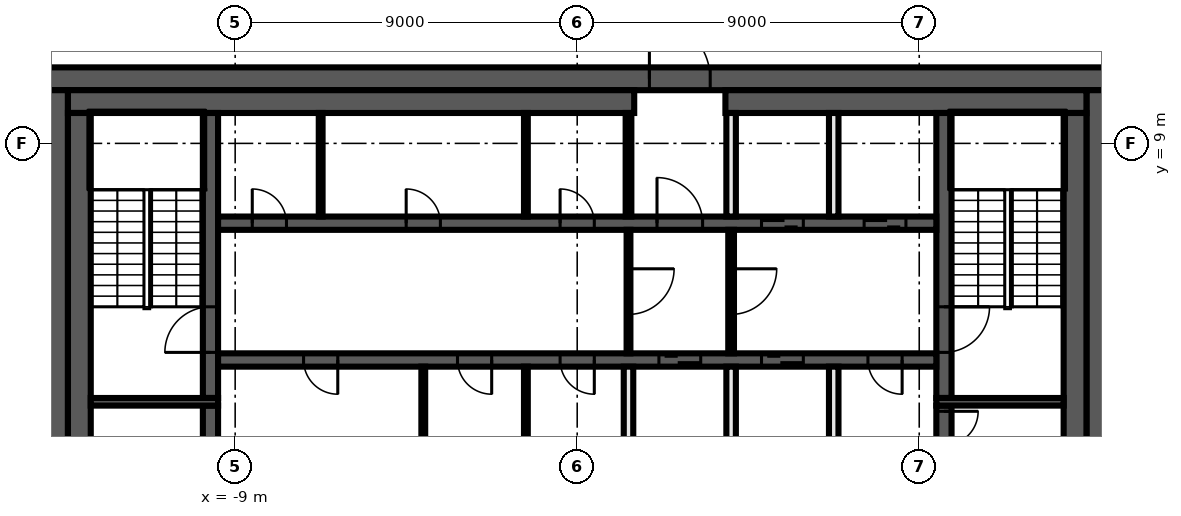
"""IFC4 building model, lengths in metres.
Left out: names, types, materials, properties, quantities, classifications, styles, units other than length and angle.
Written with IfcOpenShell. Run it as: python <this file> out.ifc"""

import sys

from ifc_helpers import new_model, si_unit, direction, frame, frame_2d, origin, place, context, subcontext, project, spatial, rectangle, extrude, element, fill, save


model = new_model("IFC4")
c1 = context("Model", 3, precision=1e-05, world=origin(), true_north=direction((0.0, 1.0)))
c2 = subcontext(c1, "Body", "Model", "MODEL_VIEW")
j1 = project(units=[si_unit("LENGTHUNIT", "METRE"), si_unit("PLANEANGLEUNIT", "RADIAN")], contexts=[c1])
p1 = place(None, origin())
s1 = spatial("IfcSite", under=j1, at=p1, CompositionType="ELEMENT")
p2 = place(p1, origin())
s2 = spatial("IfcBuilding", under=s1, at=p2, CompositionType="ELEMENT")
p3 = place(p2, frame((0.0, 0.0, 315.2)))
s3 = spatial("IfcBuildingStorey", under=s2, at=p3, CompositionType="ELEMENT", Elevation=315.2)
p4 = place(p3, frame((-14.0, 10.7, 0.0), z_axis=(0.0, 0.0, 1.0), x_axis=(1.0, 0.0, 0.0)))
e1 = element("IfcWall", 1, at=p4, inside=s3, PredefinedType="SHEAR", context=c2, shape_type="SweptSolid", body=[
    extrude(rectangle(XDim=28.0, YDim=0.6, at=frame_2d((14.0, 0.0))), origin(), (0.0, 0.0, 1.0), 3.82),
])
p5 = place(p4, frame((15.9, 0.0, 0.0)))
e2 = element("IfcOpeningElement", 2, at=p5, cuts=e1, PredefinedType="OPENING", context=c2, shape_type="SweptSolid", body=[
    extrude(rectangle(XDim=1.6, YDim=2.1, at=frame_2d((0.8, 1.05))), frame((0.0, 0.31, 0.0), z_axis=(0.0, -1.0, 0.0), x_axis=(1.0, 0.0, 0.0)), (0.0, 0.0, 1.0), 0.62),
])
for number, where, z_axis, x_axis in (
    (3, (13.7, 10.4, 0.0), (0.0, 0.0, 1.0), (0.0, -1.0, 0.0)),
    (4, (-13.7, -10.4, 0.0), (0.0, 0.0, 1.0), (0.0, 1.0, 0.0)),
):
    element("IfcWall", number, at=place(p3, frame(where, z_axis=z_axis, x_axis=x_axis)), inside=s3, PredefinedType="SHEAR", context=c2, shape_type="SweptSolid", body=[
        extrude(rectangle(XDim=20.8, YDim=0.6, at=frame_2d((10.4, 0.0))), origin(), (0.0, 0.0, 1.0), 3.82),
    ])
p6 = place(p3, frame((-13.4, 10.1, 0.0), z_axis=(0.0, 0.0, 1.0), x_axis=(1.0, 0.0, 0.0)))
e5 = element("IfcWall", 5, at=p6, inside=s3, PredefinedType="SHEAR", context=c2, shape_type="SweptSolid", body=[
    extrude(rectangle(XDim=14.9, YDim=0.6, at=frame_2d((7.45, 0.0))), origin(), (0.0, 0.0, 1.0), 3.82),
])
p7 = place(p3, frame((3.9, 10.1, 0.0), z_axis=(0.0, 0.0, 1.0), x_axis=(1.0, 0.0, 0.0)))
e6 = element("IfcWall", 6, at=p7, inside=s3, PredefinedType="SHEAR", context=c2, shape_type="SweptSolid", body=[
    extrude(rectangle(XDim=9.5, YDim=0.6, at=frame_2d((4.75, 0.0))), origin(), (0.0, 0.0, 1.0), 3.82),
])
for number, where, z_axis, x_axis in (
    (7, (13.1, 9.8, 0.0), (0.0, 0.0, 1.0), (0.0, -1.0, 0.0)),
    (8, (-13.1, -9.8, 0.0), (0.0, 0.0, 1.0), (0.0, 1.0, 0.0)),
):
    element("IfcWall", number, at=place(p3, frame(where, z_axis=z_axis, x_axis=x_axis)), inside=s3, PredefinedType="SHEAR", context=c2, shape_type="SweptSolid", body=[
        extrude(rectangle(XDim=19.6, YDim=0.6, at=frame_2d((9.8, 0.0))), origin(), (0.0, 0.0, 1.0), 3.82),
    ])
p8 = place(p3, frame((9.65, 2.1, 0.0), z_axis=(0.0, 0.0, 1.0), x_axis=(0.0, -1.0, 0.0)))
e9 = element("IfcWall", 9, at=p8, inside=s3, PredefinedType="SHEAR", context=c2, shape_type="SweptSolid", body=[
    extrude(rectangle(XDim=4.2, YDim=0.4, at=frame_2d((2.1, 0.0))), origin(), (0.0, 0.0, 1.0), 3.82),
])
p9 = place(p8, frame((0.15, 0.0, 0.0)))
e10 = element("IfcOpeningElement", 10, at=p9, cuts=e9, PredefinedType="OPENING", context=c2, shape_type="SweptSolid", body=[
    extrude(rectangle(XDim=0.9, YDim=2.1, at=frame_2d((0.45, 1.05))), frame((0.0, 0.21, 0.0), z_axis=(0.0, -1.0, 0.0), x_axis=(1.0, 0.0, 0.0)), (0.0, 0.0, 1.0), 0.42),
])
p10 = place(p3, frame((9.65, 9.8, 0.0), z_axis=(0.0, 0.0, 1.0), x_axis=(0.0, -1.0, 0.0)))
e11 = element("IfcWall", 11, at=p10, inside=s3, PredefinedType="SHEAR", context=c2, shape_type="SweptSolid", body=[
    extrude(rectangle(XDim=7.5, YDim=0.4, at=frame_2d((3.75, 0.0))), origin(), (0.0, 0.0, 1.0), 3.82),
])
p11 = place(p10, frame((5.1, 0.0, 0.0)))
e12 = element("IfcOpeningElement", 12, at=p11, cuts=e11, PredefinedType="OPENING", context=c2, shape_type="SweptSolid", body=[
    extrude(rectangle(XDim=1.2, YDim=2.1, at=frame_2d((0.6, 1.05))), frame((0.0, 0.21, 0.0), z_axis=(0.0, -1.0, 0.0), x_axis=(1.0, 0.0, 0.0)), (0.0, 0.0, 1.0), 0.42),
])
p12 = place(p3, frame((-9.65, -2.1, 0.0), z_axis=(0.0, 0.0, 1.0), x_axis=(0.0, 1.0, 0.0)))
e13 = element("IfcWall", 13, at=p12, inside=s3, PredefinedType="SHEAR", context=c2, shape_type="SweptSolid", body=[
    extrude(rectangle(XDim=4.2, YDim=0.4, at=frame_2d((2.1, 0.0))), origin(), (0.0, 0.0, 1.0), 3.82),
])
p13 = place(p3, frame((-9.65, 2.3, 0.0), z_axis=(0.0, 0.0, 1.0), x_axis=(0.0, 1.0, 0.0)))
e14 = element("IfcWall", 14, at=p13, inside=s3, PredefinedType="SHEAR", context=c2, shape_type="SweptSolid", body=[
    extrude(rectangle(XDim=7.5, YDim=0.4, at=frame_2d((3.75, 0.0))), origin(), (0.0, 0.0, 1.0), 3.82),
])
p14 = place(p13, frame((1.2, 0.0, 0.0)))
e15 = element("IfcOpeningElement", 15, at=p14, cuts=e14, PredefinedType="OPENING", context=c2, shape_type="SweptSolid", body=[
    extrude(rectangle(XDim=1.2, YDim=2.1, at=frame_2d((0.6, 1.05))), frame((0.0, 0.21, 0.0), z_axis=(0.0, -1.0, 0.0), x_axis=(1.0, 0.0, 0.0)), (0.0, 0.0, 1.0), 0.42),
])
for number, where, z_axis, x_axis in (
    (16, (9.45, 2.2, 0.0), (0.0, 0.0, 1.0), (1.0, 0.0, 0.0)),
    (17, (-9.45, 2.2, 0.0), (0.0, 0.0, 1.0), (-1.0, 0.0, 0.0)),
):
    element("IfcWall", number, at=place(p3, frame(where, z_axis=z_axis, x_axis=x_axis)), inside=s3, PredefinedType="SHEAR", context=c2, shape_type="SweptSolid", body=[
        extrude(rectangle(XDim=3.35, YDim=0.2, at=frame_2d((1.675, 0.0))), origin(), (0.0, 0.0, 1.0), 3.82),
    ])
p15 = place(p3, frame((-9.45, 6.9, 0.0), z_axis=(0.0, 0.0, 1.0), x_axis=(1.0, 0.0, 0.0)))
e18 = element("IfcWall", 18, at=p15, inside=s3, PredefinedType="SHEAR", context=c2, shape_type="SweptSolid", body=[
    extrude(rectangle(XDim=18.9, YDim=0.35, at=frame_2d((9.45, 0.0))), origin(), (0.0, 0.0, 1.0), 3.82),
])
p16 = place(p15, frame((11.55, 0.0, 0.0)))
e19 = element("IfcOpeningElement", 19, at=p16, cuts=e18, PredefinedType="OPENING", context=c2, shape_type="SweptSolid", body=[
    extrude(rectangle(XDim=1.2, YDim=2.1, at=frame_2d((0.6, 1.05))), frame((0.0, 0.185, 0.0), z_axis=(0.0, -1.0, 0.0), x_axis=(1.0, 0.0, 0.0)), (0.0, 0.0, 1.0), 0.37),
])
p17 = place(p15, frame((14.3, 0.0, 0.0)))
e20 = element("IfcOpeningElement", 20, at=p17, cuts=e18, PredefinedType="OPENING", context=c2, shape_type="SweptSolid", body=[
    extrude(rectangle(XDim=1.1, YDim=2.1, at=frame_2d((0.55, 1.05))), frame((0.0, 0.185, 0.0), z_axis=(0.0, -1.0, 0.0), x_axis=(1.0, 0.0, 0.0)), (0.0, 0.0, 1.0), 0.37),
])
p18 = place(p15, frame((17.0, 0.0, 0.0)))
e21 = element("IfcOpeningElement", 21, at=p18, cuts=e18, PredefinedType="OPENING", context=c2, shape_type="SweptSolid", body=[
    extrude(rectangle(XDim=1.1, YDim=2.1, at=frame_2d((0.55, 1.05))), frame((0.0, 0.185, 0.0), z_axis=(0.0, -1.0, 0.0), x_axis=(1.0, 0.0, 0.0)), (0.0, 0.0, 1.0), 0.37),
])
p19 = place(p15, frame((0.9, 0.0, 0.0)))
e22 = element("IfcOpeningElement", 22, at=p19, cuts=e18, PredefinedType="OPENING", context=c2, shape_type="SweptSolid", body=[
    extrude(rectangle(XDim=0.9, YDim=2.1, at=frame_2d((0.45, 1.05))), frame((0.0, 0.185, 0.0), z_axis=(0.0, -1.0, 0.0), x_axis=(1.0, 0.0, 0.0)), (0.0, 0.0, 1.0), 0.37),
])
p20 = place(p15, frame((4.95, 0.0, 0.0)))
e23 = element("IfcOpeningElement", 23, at=p20, cuts=e18, PredefinedType="OPENING", context=c2, shape_type="SweptSolid", body=[
    extrude(rectangle(XDim=0.9, YDim=2.1, at=frame_2d((0.45, 1.05))), frame((0.0, 0.185, 0.0), z_axis=(0.0, -1.0, 0.0), x_axis=(1.0, 0.0, 0.0)), (0.0, 0.0, 1.0), 0.37),
])
p21 = place(p15, frame((9.0, 0.0, 0.0)))
e24 = element("IfcOpeningElement", 24, at=p21, cuts=e18, PredefinedType="OPENING", context=c2, shape_type="SweptSolid", body=[
    extrude(rectangle(XDim=0.9, YDim=2.1, at=frame_2d((0.45, 1.05))), frame((0.0, 0.185, 0.0), z_axis=(0.0, -1.0, 0.0), x_axis=(1.0, 0.0, 0.0)), (0.0, 0.0, 1.0), 0.37),
])
p22 = place(p3, frame((9.45, 3.3, 0.0), z_axis=(0.0, 0.0, 1.0), x_axis=(-1.0, 0.0, 0.0)))
e25 = element("IfcWall", 25, at=p22, inside=s3, PredefinedType="SHEAR", context=c2, shape_type="SweptSolid", body=[
    extrude(rectangle(XDim=18.9, YDim=0.35, at=frame_2d((9.45, 0.0))), origin(), (0.0, 0.0, 1.0), 3.82),
])
p23 = place(p22, frame((6.2, 0.0, 0.0)))
e26 = element("IfcOpeningElement", 26, at=p23, cuts=e25, PredefinedType="OPENING", context=c2, shape_type="SweptSolid", body=[
    extrude(rectangle(XDim=1.1, YDim=2.1, at=frame_2d((0.55, 1.05))), frame((0.0, 0.185, 0.0), z_axis=(0.0, -1.0, 0.0), x_axis=(1.0, 0.0, 0.0)), (0.0, 0.0, 1.0), 0.37),
])
p24 = place(p22, frame((3.5, 0.0, 0.0)))
e27 = element("IfcOpeningElement", 27, at=p24, cuts=e25, PredefinedType="OPENING", context=c2, shape_type="SweptSolid", body=[
    extrude(rectangle(XDim=1.1, YDim=2.1, at=frame_2d((0.55, 1.05))), frame((0.0, 0.185, 0.0), z_axis=(0.0, -1.0, 0.0), x_axis=(1.0, 0.0, 0.0)), (0.0, 0.0, 1.0), 0.37),
])
p25 = place(p22, frame((0.9, 0.0, 0.0)))
e28 = element("IfcOpeningElement", 28, at=p25, cuts=e25, PredefinedType="OPENING", context=c2, shape_type="SweptSolid", body=[
    extrude(rectangle(XDim=0.9, YDim=2.1, at=frame_2d((0.45, 1.05))), frame((0.0, 0.185, 0.0), z_axis=(0.0, -1.0, 0.0), x_axis=(1.0, 0.0, 0.0)), (0.0, 0.0, 1.0), 0.37),
])
p26 = place(p22, frame((15.75, 0.0, 0.0)))
e29 = element("IfcOpeningElement", 29, at=p26, cuts=e25, PredefinedType="OPENING", context=c2, shape_type="SweptSolid", body=[
    extrude(rectangle(XDim=0.9, YDim=2.1, at=frame_2d((0.45, 1.05))), frame((0.0, 0.185, 0.0), z_axis=(0.0, -1.0, 0.0), x_axis=(1.0, 0.0, 0.0)), (0.0, 0.0, 1.0), 0.37),
])
p27 = place(p22, frame((11.7, 0.0, 0.0)))
e30 = element("IfcOpeningElement", 30, at=p27, cuts=e25, PredefinedType="OPENING", context=c2, shape_type="SweptSolid", body=[
    extrude(rectangle(XDim=0.9, YDim=2.1, at=frame_2d((0.45, 1.05))), frame((0.0, 0.185, 0.0), z_axis=(0.0, -1.0, 0.0), x_axis=(1.0, 0.0, 0.0)), (0.0, 0.0, 1.0), 0.37),
])
p28 = place(p22, frame((9.0, 0.0, 0.0)))
e31 = element("IfcOpeningElement", 31, at=p28, cuts=e25, PredefinedType="OPENING", context=c2, shape_type="SweptSolid", body=[
    extrude(rectangle(XDim=0.9, YDim=2.1, at=frame_2d((0.45, 1.05))), frame((0.0, 0.185, 0.0), z_axis=(0.0, -1.0, 0.0), x_axis=(1.0, 0.0, 0.0)), (0.0, 0.0, 1.0), 0.37),
])
for number, where, z_axis, x_axis in (
    (32, (6.75, 0.4, 0.0), (0.0, 0.0, 1.0), (0.0, 1.0, 0.0)),
    (33, (6.75, 7.075, 0.0), (0.0, 0.0, 1.0), (0.0, 1.0, 0.0)),
):
    element("IfcWall", number, at=place(p3, frame(where, z_axis=z_axis, x_axis=x_axis)), inside=s3, PredefinedType="SOLIDWALL", context=c2, shape_type="SweptSolid", body=[
        extrude(rectangle(XDim=2.725, YDim=0.25, at=frame_2d((1.363, 0.0))), origin(), (0.0, 0.0, 1.0), 3.82),
    ])
p29 = place(p3, frame((4.05, 6.725, 0.0), z_axis=(0.0, 0.0, 1.0), x_axis=(0.0, -1.0, 0.0)))
e34 = element("IfcWall", 34, at=p29, inside=s3, PredefinedType="PARTITIONING", context=c2, shape_type="SweptSolid", body=[
    extrude(rectangle(XDim=3.25, YDim=0.15, at=frame_2d((1.625, 0.0))), origin(), (0.0, 0.0, 1.0), 3.82),
])
p30 = place(p29, frame((1.025, 0.0, 0.0)))
e35 = element("IfcOpeningElement", 35, at=p30, cuts=e34, PredefinedType="OPENING", context=c2, shape_type="SweptSolid", body=[
    extrude(rectangle(XDim=1.2, YDim=2.1, at=frame_2d((0.6, 1.05))), frame((0.0, 0.085, 0.0), z_axis=(0.0, -1.0, 0.0), x_axis=(1.0, 0.0, 0.0)), (0.0, 0.0, 1.0), 0.17),
])
for number, where, z_axis, x_axis in (
    (36, (4.05, 0.4, 0.0), (0.0, 0.0, 1.0), (0.0, 1.0, 0.0)),
    (37, (4.05, 7.075, 0.0), (0.0, 0.0, 1.0), (0.0, 1.0, 0.0)),
):
    element("IfcWall", number, at=place(p3, frame(where, z_axis=z_axis, x_axis=x_axis)), inside=s3, PredefinedType="SOLIDWALL", context=c2, shape_type="SweptSolid", body=[
        extrude(rectangle(XDim=2.725, YDim=0.25, at=frame_2d((1.363, 0.0))), origin(), (0.0, 0.0, 1.0), 3.82),
    ])
p31 = place(p3, frame((1.35, 7.075, 0.0), z_axis=(0.0, 0.0, 1.0), x_axis=(0.0, 1.0, 0.0)))
e38 = element("IfcWall", 38, at=p31, inside=s3, PredefinedType="PARTITIONING", context=c2, shape_type="SweptSolid", body=[
    extrude(rectangle(XDim=2.725, YDim=0.15, at=frame_2d((1.363, 0.0))), origin(), (0.0, 0.0, 1.0), 3.82),
])
p32 = place(p3, frame((1.35, 6.725, 0.0), z_axis=(0.0, 0.0, 1.0), x_axis=(0.0, -1.0, 0.0)))
e39 = element("IfcWall", 39, at=p32, inside=s3, PredefinedType="PARTITIONING", context=c2, shape_type="SweptSolid", body=[
    extrude(rectangle(XDim=3.25, YDim=0.1, at=frame_2d((1.625, 0.0))), origin(), (0.0, 0.0, 1.0), 3.82),
])
p33 = place(p32, frame((1.025, 0.0, 0.0)))
e40 = element("IfcOpeningElement", 40, at=p33, cuts=e39, PredefinedType="OPENING", context=c2, shape_type="SweptSolid", body=[
    extrude(rectangle(XDim=1.2, YDim=2.1, at=frame_2d((0.6, 1.05))), frame((0.0, 0.06, 0.0), z_axis=(0.0, -1.0, 0.0), x_axis=(1.0, 0.0, 0.0)), (0.0, 0.0, 1.0), 0.12),
])
p34 = place(p3, frame((1.35, 0.4, 0.0), z_axis=(0.0, 0.0, 1.0), x_axis=(0.0, 1.0, 0.0)))
e41 = element("IfcWall", 41, at=p34, inside=s3, PredefinedType="SOLIDWALL", context=c2, shape_type="SweptSolid", body=[
    extrude(rectangle(XDim=2.725, YDim=0.25, at=frame_2d((1.363, 0.0))), origin(), (0.0, 0.0, 1.0), 3.82),
])
for number, where, z_axis, x_axis in (
    (42, (-1.35, 0.4, 0.0), (0.0, 0.0, 1.0), (0.0, 1.0, 0.0)),
    (43, (-1.35, 7.075, 0.0), (0.0, 0.0, 1.0), (0.0, 1.0, 0.0)),
    (44, (-4.05, 0.4, 0.0), (0.0, 0.0, 1.0), (0.0, 1.0, 0.0)),
    (45, (-6.75, 7.075, 0.0), (0.0, 0.0, 1.0), (0.0, 1.0, 0.0)),
):
    element("IfcWall", number, at=place(p3, frame(where, z_axis=z_axis, x_axis=x_axis)), inside=s3, PredefinedType="PARTITIONING", context=c2, shape_type="SweptSolid", body=[
        extrude(rectangle(XDim=2.725, YDim=0.1, at=frame_2d((1.363, 0.0))), origin(), (0.0, 0.0, 1.0), 3.82),
    ])
p35 = place(p9, origin())
e46 = element("IfcDoor", 46, at=p35, inside=s3, OperationType="SINGLE_SWING_RIGHT", PredefinedType="DOOR", context=c2, shape_type="SweptSolid", body=[
    extrude(rectangle(XDim=0.9, YDim=2.1, at=frame_2d((0.45, 1.05))), frame((0.0, 0.025, 0.0), z_axis=(0.0, -1.0, 0.0), x_axis=(1.0, 0.0, 0.0)), (0.0, 0.0, 1.0), 0.05),
])
fill(e10, e46)
p36 = place(p5, origin())
e47 = element("IfcDoor", 47, at=p36, inside=s3, OperationType="DOUBLE_DOOR_SINGLE_SWING", PredefinedType="DOOR", context=c2, shape_type="SweptSolid", body=[
    extrude(rectangle(XDim=1.6, YDim=2.1, at=frame_2d((0.8, 1.05))), frame((0.0, 0.025, 0.0), z_axis=(0.0, -1.0, 0.0), x_axis=(1.0, 0.0, 0.0)), (0.0, 0.0, 1.0), 0.05),
])
fill(e2, e47)
p37 = place(p16, origin())
e48 = element("IfcDoor", 48, at=p37, inside=s3, OperationType="SINGLE_SWING_LEFT", PredefinedType="DOOR", context=c2, shape_type="SweptSolid", body=[
    extrude(rectangle(XDim=1.2, YDim=2.1, at=frame_2d((0.6, 1.05))), frame((0.0, 0.025, 0.0), z_axis=(0.0, -1.0, 0.0), x_axis=(1.0, 0.0, 0.0)), (0.0, 0.0, 1.0), 0.05),
])
fill(e19, e48)
p38 = place(p17, origin())
e49 = element("IfcDoor", 49, at=p38, inside=s3, OperationType="DOUBLE_DOOR_SLIDING", PredefinedType="DOOR", context=c2, shape_type="SweptSolid", body=[
    extrude(rectangle(XDim=1.1, YDim=2.1, at=frame_2d((0.55, 1.05))), frame((0.0, 0.025, 0.0), z_axis=(0.0, -1.0, 0.0), x_axis=(1.0, 0.0, 0.0)), (0.0, 0.0, 1.0), 0.05),
])
fill(e20, e49)
p39 = place(p18, origin())
e50 = element("IfcDoor", 50, at=p39, inside=s3, OperationType="DOUBLE_DOOR_SLIDING", PredefinedType="DOOR", context=c2, shape_type="SweptSolid", body=[
    extrude(rectangle(XDim=1.1, YDim=2.1, at=frame_2d((0.55, 1.05))), frame((0.0, 0.025, 0.0), z_axis=(0.0, -1.0, 0.0), x_axis=(1.0, 0.0, 0.0)), (0.0, 0.0, 1.0), 0.05),
])
fill(e21, e50)
p40 = place(p23, origin())
e51 = element("IfcDoor", 51, at=p40, inside=s3, OperationType="DOUBLE_DOOR_SLIDING", PredefinedType="DOOR", context=c2, shape_type="SweptSolid", body=[
    extrude(rectangle(XDim=1.1, YDim=2.1, at=frame_2d((0.55, 1.05))), frame((0.0, 0.025, 0.0), z_axis=(0.0, -1.0, 0.0), x_axis=(1.0, 0.0, 0.0)), (0.0, 0.0, 1.0), 0.05),
])
fill(e26, e51)
p41 = place(p24, origin())
e52 = element("IfcDoor", 52, at=p41, inside=s3, OperationType="DOUBLE_DOOR_SLIDING", PredefinedType="DOOR", context=c2, shape_type="SweptSolid", body=[
    extrude(rectangle(XDim=1.1, YDim=2.1, at=frame_2d((0.55, 1.05))), frame((0.0, 0.025, 0.0), z_axis=(0.0, -1.0, 0.0), x_axis=(1.0, 0.0, 0.0)), (0.0, 0.0, 1.0), 0.05),
])
fill(e27, e52)
p42 = place(p25, origin())
e53 = element("IfcDoor", 53, at=p42, inside=s3, OperationType="SINGLE_SWING_LEFT", PredefinedType="DOOR", context=c2, shape_type="SweptSolid", body=[
    extrude(rectangle(XDim=0.9, YDim=2.1, at=frame_2d((0.45, 1.05))), frame((0.0, 0.025, 0.0), z_axis=(0.0, -1.0, 0.0), x_axis=(1.0, 0.0, 0.0)), (0.0, 0.0, 1.0), 0.05),
])
fill(e28, e53)
p43 = place(p19, origin())
e54 = element("IfcDoor", 54, at=p43, inside=s3, OperationType="SINGLE_SWING_RIGHT", PredefinedType="DOOR", context=c2, shape_type="SweptSolid", body=[
    extrude(rectangle(XDim=0.9, YDim=2.1, at=frame_2d((0.45, 1.05))), frame((0.0, 0.025, 0.0), z_axis=(0.0, -1.0, 0.0), x_axis=(1.0, 0.0, 0.0)), (0.0, 0.0, 1.0), 0.05),
])
fill(e22, e54)
p44 = place(p20, origin())
e55 = element("IfcDoor", 55, at=p44, inside=s3, OperationType="SINGLE_SWING_LEFT", PredefinedType="DOOR", context=c2, shape_type="SweptSolid", body=[
    extrude(rectangle(XDim=0.9, YDim=2.1, at=frame_2d((0.45, 1.05))), frame((0.0, 0.025, 0.0), z_axis=(0.0, -1.0, 0.0), x_axis=(1.0, 0.0, 0.0)), (0.0, 0.0, 1.0), 0.05),
])
fill(e23, e55)
p45 = place(p21, origin())
e56 = element("IfcDoor", 56, at=p45, inside=s3, OperationType="SINGLE_SWING_RIGHT", PredefinedType="DOOR", context=c2, shape_type="SweptSolid", body=[
    extrude(rectangle(XDim=0.9, YDim=2.1, at=frame_2d((0.45, 1.05))), frame((0.0, 0.025, 0.0), z_axis=(0.0, -1.0, 0.0), x_axis=(1.0, 0.0, 0.0)), (0.0, 0.0, 1.0), 0.05),
])
fill(e24, e56)
p46 = place(p26, origin())
e57 = element("IfcDoor", 57, at=p46, inside=s3, OperationType="SINGLE_SWING_LEFT", PredefinedType="DOOR", context=c2, shape_type="SweptSolid", body=[
    extrude(rectangle(XDim=0.9, YDim=2.1, at=frame_2d((0.45, 1.05))), frame((0.0, 0.025, 0.0), z_axis=(0.0, -1.0, 0.0), x_axis=(1.0, 0.0, 0.0)), (0.0, 0.0, 1.0), 0.05),
])
fill(e29, e57)
p47 = place(p27, origin())
e58 = element("IfcDoor", 58, at=p47, inside=s3, OperationType="SINGLE_SWING_RIGHT", PredefinedType="DOOR", context=c2, shape_type="SweptSolid", body=[
    extrude(rectangle(XDim=0.9, YDim=2.1, at=frame_2d((0.45, 1.05))), frame((0.0, 0.025, 0.0), z_axis=(0.0, -1.0, 0.0), x_axis=(1.0, 0.0, 0.0)), (0.0, 0.0, 1.0), 0.05),
])
fill(e30, e58)
p48 = place(p28, origin())
e59 = element("IfcDoor", 59, at=p48, inside=s3, OperationType="SINGLE_SWING_LEFT", PredefinedType="DOOR", context=c2, shape_type="SweptSolid", body=[
    extrude(rectangle(XDim=0.9, YDim=2.1, at=frame_2d((0.45, 1.05))), frame((0.0, 0.025, 0.0), z_axis=(0.0, -1.0, 0.0), x_axis=(1.0, 0.0, 0.0)), (0.0, 0.0, 1.0), 0.05),
])
fill(e31, e59)
p49 = place(p11, origin())
e60 = element("IfcDoor", 60, at=p49, inside=s3, OperationType="SINGLE_SWING_LEFT", PredefinedType="DOOR", context=c2, shape_type="SweptSolid", body=[
    extrude(rectangle(XDim=1.2, YDim=2.1, at=frame_2d((0.6, 1.05))), frame((0.0, 0.025, 0.0), z_axis=(0.0, -1.0, 0.0), x_axis=(1.0, 0.0, 0.0)), (0.0, 0.0, 1.0), 0.05),
])
fill(e12, e60)
p50 = place(p14, origin())
e61 = element("IfcDoor", 61, at=p50, inside=s3, OperationType="SINGLE_SWING_RIGHT", PredefinedType="DOOR", context=c2, shape_type="SweptSolid", body=[
    extrude(rectangle(XDim=1.2, YDim=2.1, at=frame_2d((0.6, 1.05))), frame((0.0, 0.025, 0.0), z_axis=(0.0, -1.0, 0.0), x_axis=(1.0, 0.0, 0.0)), (0.0, 0.0, 1.0), 0.05),
])
fill(e15, e61)
p51 = place(p33, origin())
e62 = element("IfcDoor", 62, at=p51, inside=s3, OperationType="SINGLE_SWING_LEFT", PredefinedType="DOOR", context=c2, shape_type="SweptSolid", body=[
    extrude(rectangle(XDim=1.2, YDim=2.1, at=frame_2d((0.6, 1.05))), frame((0.0, 0.025, 0.0), z_axis=(0.0, -1.0, 0.0), x_axis=(1.0, 0.0, 0.0)), (0.0, 0.0, 1.0), 0.05),
])
fill(e40, e62)
p52 = place(p30, origin())
e63 = element("IfcDoor", 63, at=p52, inside=s3, OperationType="SINGLE_SWING_RIGHT", PredefinedType="DOOR", context=c2, shape_type="SweptSolid", body=[
    extrude(rectangle(XDim=1.2, YDim=2.1, at=frame_2d((0.6, 1.05))), frame((0.0, 0.025, 0.0), z_axis=(0.0, -1.0, 0.0), x_axis=(1.0, 0.0, 0.0)), (0.0, 0.0, 1.0), 0.05),
])
fill(e35, e63)
save(model, sys.argv[1])
